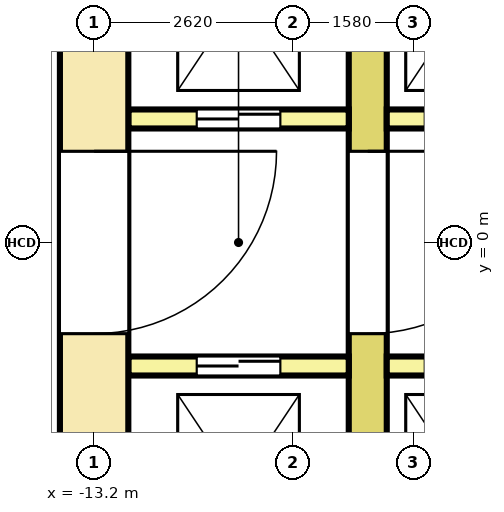
"""IFC4 building model, lengths in metres.
Left out: names, types, materials, properties, quantities, classifications, styles, units other than length and angle.
Written with IfcOpenShell. Run it as: python <this file> out.ifc"""

import sys

from ifc_helpers import new_model, si_unit, direction, frame, frame_2d, origin, place, context, subcontext, project, spatial, rectangle, extrude, element, fill, save


model = new_model("IFC4")
c1 = context("Model", 3, precision=1e-05, world=origin(), true_north=direction((0.0, 1.0)))
c2 = subcontext(c1, "Body", "Model", "MODEL_VIEW")
j1 = project(units=[si_unit("LENGTHUNIT", "METRE"), si_unit("PLANEANGLEUNIT", "RADIAN")], contexts=[c1])
p1 = place(None, origin())
s1 = spatial("IfcSite", under=j1, at=p1, CompositionType="ELEMENT")
p2 = place(p1, origin())
s2 = spatial("IfcBuilding", under=s1, at=p2, CompositionType="ELEMENT")
p3 = place(p2, frame((0.0, 0.0, 23.4)))
s3 = spatial("IfcBuildingStorey", under=s2, at=p3, CompositionType="ELEMENT", Elevation=23.4)
p4 = place(p3, frame((-13.2, -10.35, 0.0), z_axis=(0.0, 0.0, 1.0), x_axis=(0.0, 1.0, 0.0)))
e1 = element("IfcWall", 1, at=p4, inside=s3, PredefinedType="SHEAR", context=c2, shape_type="SweptSolid", body=[
    extrude(rectangle(XDim=20.7, YDim=0.9, at=frame_2d((10.35, 0.0))), origin(), (0.0, 0.0, 1.0), 4.1),
])
p5 = place(p4, frame((9.15, 0.0, 0.0)))
e2 = element("IfcOpeningElement", 2, at=p5, cuts=e1, PredefinedType="OPENING", context=c2, shape_type="SweptSolid", body=[
    extrude(rectangle(XDim=2.4, YDim=2.1, at=frame_2d((1.2, 1.05))), frame((0.0, 0.46, 0.0), z_axis=(0.0, -1.0, 0.0), x_axis=(1.0, 0.0, 0.0)), (0.0, 0.0, 1.0), 0.92),
])
p6 = place(p4, frame((16.05, 0.0, 0.0)))
e3 = element("IfcOpeningElement", 3, at=p6, cuts=e1, PredefinedType="OPENING", context=c2, shape_type="SweptSolid", body=[
    extrude(rectangle(XDim=1.2, YDim=2.1, at=frame_2d((0.6, 1.05))), frame((0.0, 0.46, 0.0), z_axis=(0.0, -1.0, 0.0), x_axis=(1.0, 0.0, 0.0)), (0.0, 0.0, 1.0), 0.92),
])
p7 = place(p4, frame((3.45, 0.0, 0.0)))
e4 = element("IfcOpeningElement", 4, at=p7, cuts=e1, PredefinedType="OPENING", context=c2, shape_type="SweptSolid", body=[
    extrude(rectangle(XDim=1.2, YDim=2.1, at=frame_2d((0.6, 1.05))), frame((0.0, 0.46, 0.0), z_axis=(0.0, -1.0, 0.0), x_axis=(1.0, 0.0, 0.0)), (0.0, 0.0, 1.0), 0.92),
])
p8 = place(p3, frame((-9.6, -7.7, 0.0), z_axis=(0.0, 0.0, 1.0), x_axis=(0.0, 1.0, 0.0)))
e5 = element("IfcWall", 5, at=p8, inside=s3, PredefinedType="SHEAR", context=c2, shape_type="SweptSolid", body=[
    extrude(rectangle(XDim=15.4, YDim=0.5, at=frame_2d((7.7, 0.0))), origin(), (0.0, 0.0, 1.0), 4.1),
])
p9 = place(p8, frame((6.5, 0.0, 0.0)))
e6 = element("IfcOpeningElement", 6, at=p9, cuts=e5, PredefinedType="OPENING", context=c2, shape_type="SweptSolid", body=[
    extrude(rectangle(XDim=2.4, YDim=2.1, at=frame_2d((1.2, 1.05))), frame((0.0, 0.26, 0.0), z_axis=(0.0, -1.0, 0.0), x_axis=(1.0, 0.0, 0.0)), (0.0, 0.0, 1.0), 0.52),
])
p10 = place(p8, frame((13.4, 0.0, 0.0)))
e7 = element("IfcOpeningElement", 7, at=p10, cuts=e5, PredefinedType="OPENING", context=c2, shape_type="SweptSolid", body=[
    extrude(rectangle(XDim=1.2, YDim=2.1, at=frame_2d((0.6, 1.05))), frame((0.0, 0.26, 0.0), z_axis=(0.0, -1.0, 0.0), x_axis=(1.0, 0.0, 0.0)), (0.0, 0.0, 1.0), 0.52),
])
p11 = place(p8, frame((0.8, 0.0, 0.0)))
e8 = element("IfcOpeningElement", 8, at=p11, cuts=e5, PredefinedType="OPENING", context=c2, shape_type="SweptSolid", body=[
    extrude(rectangle(XDim=1.2, YDim=2.1, at=frame_2d((0.6, 1.05))), frame((0.0, 0.26, 0.0), z_axis=(0.0, -1.0, 0.0), x_axis=(1.0, 0.0, 0.0)), (0.0, 0.0, 1.0), 0.52),
])
p12 = place(p3, frame((-12.75, 1.625, 0.0), z_axis=(0.0, 0.0, 1.0), x_axis=(1.0, 0.0, 0.0)))
e9 = element("IfcWall", 9, at=p12, inside=s3, PredefinedType="SOLIDWALL", context=c2, shape_type="SweptSolid", body=[
    extrude(rectangle(XDim=2.9, YDim=0.25, at=frame_2d((1.45, 0.0))), origin(), (0.0, 0.0, 1.0), 4.1),
])
p13 = place(p12, frame((0.9, 0.0, 0.0)))
e10 = element("IfcOpeningElement", 10, at=p13, cuts=e9, PredefinedType="OPENING", context=c2, shape_type="SweptSolid", body=[
    extrude(rectangle(XDim=1.1, YDim=2.1, at=frame_2d((0.55, 1.05))), frame((0.0, 0.135, 0.0), z_axis=(0.0, -1.0, 0.0), x_axis=(1.0, 0.0, 0.0)), (0.0, 0.0, 1.0), 0.27),
])
p14 = place(p3, frame((-9.35, 1.625, 0.0), z_axis=(0.0, 0.0, 1.0), x_axis=(1.0, 0.0, 0.0)))
e11 = element("IfcWall", 11, at=p14, inside=s3, PredefinedType="SOLIDWALL", context=c2, shape_type="SweptSolid", body=[
    extrude(rectangle(XDim=18.7, YDim=0.25, at=frame_2d((9.35, 0.0))), origin(), (0.0, 0.0, 1.0), 4.1),
])
p15 = place(p14, frame((0.5, 0.0, 0.0)))
e12 = element("IfcOpeningElement", 12, at=p15, cuts=e11, PredefinedType="OPENING", context=c2, shape_type="SweptSolid", body=[
    extrude(rectangle(XDim=1.1, YDim=2.1, at=frame_2d((0.55, 1.05))), frame((0.0, 0.135, 0.0), z_axis=(0.0, -1.0, 0.0), x_axis=(1.0, 0.0, 0.0)), (0.0, 0.0, 1.0), 0.27),
])
p16 = place(p14, frame((17.1, 0.0, 0.0)))
e13 = element("IfcOpeningElement", 13, at=p16, cuts=e11, PredefinedType="OPENING", context=c2, shape_type="SweptSolid", body=[
    extrude(rectangle(XDim=1.1, YDim=2.1, at=frame_2d((0.55, 1.05))), frame((0.0, 0.135, 0.0), z_axis=(0.0, -1.0, 0.0), x_axis=(1.0, 0.0, 0.0)), (0.0, 0.0, 1.0), 0.27),
])
p17 = place(p3, frame((-12.75, -1.625, 0.0), z_axis=(0.0, 0.0, 1.0), x_axis=(1.0, 0.0, 0.0)))
e14 = element("IfcWall", 14, at=p17, inside=s3, PredefinedType="SOLIDWALL", context=c2, shape_type="SweptSolid", body=[
    extrude(rectangle(XDim=2.9, YDim=0.25, at=frame_2d((1.45, 0.0))), origin(), (0.0, 0.0, 1.0), 4.1),
])
p18 = place(p17, frame((0.9, 0.0, 0.0)))
e15 = element("IfcOpeningElement", 15, at=p18, cuts=e14, PredefinedType="OPENING", context=c2, shape_type="SweptSolid", body=[
    extrude(rectangle(XDim=1.1, YDim=2.1, at=frame_2d((0.55, 1.05))), frame((0.0, 0.135, 0.0), z_axis=(0.0, -1.0, 0.0), x_axis=(1.0, 0.0, 0.0)), (0.0, 0.0, 1.0), 0.27),
])
p19 = place(p3, frame((-9.35, -1.625, 0.0), z_axis=(0.0, 0.0, 1.0), x_axis=(1.0, 0.0, 0.0)))
e16 = element("IfcWall", 16, at=p19, inside=s3, PredefinedType="SOLIDWALL", context=c2, shape_type="SweptSolid", body=[
    extrude(rectangle(XDim=18.7, YDim=0.25, at=frame_2d((9.35, 0.0))), origin(), (0.0, 0.0, 1.0), 4.1),
])
p20 = place(p19, frame((0.5, 0.0, 0.0)))
e17 = element("IfcOpeningElement", 17, at=p20, cuts=e16, PredefinedType="OPENING", context=c2, shape_type="SweptSolid", body=[
    extrude(rectangle(XDim=1.1, YDim=2.1, at=frame_2d((0.55, 1.05))), frame((0.0, 0.135, 0.0), z_axis=(0.0, -1.0, 0.0), x_axis=(1.0, 0.0, 0.0)), (0.0, 0.0, 1.0), 0.27),
])
p21 = place(p19, frame((17.1, 0.0, 0.0)))
e18 = element("IfcOpeningElement", 18, at=p21, cuts=e16, PredefinedType="OPENING", context=c2, shape_type="SweptSolid", body=[
    extrude(rectangle(XDim=1.1, YDim=2.1, at=frame_2d((0.55, 1.05))), frame((0.0, 0.135, 0.0), z_axis=(0.0, -1.0, 0.0), x_axis=(1.0, 0.0, 0.0)), (0.0, 0.0, 1.0), 0.27),
])
p22 = place(p13, origin())
e19 = element("IfcDoor", 19, at=p22, inside=s3, OperationType="DOUBLE_DOOR_SLIDING", PredefinedType="DOOR", context=c2, shape_type="SweptSolid", body=[
    extrude(rectangle(XDim=1.1, YDim=2.1, at=frame_2d((0.55, 1.05))), frame((0.0, 0.075, 0.0), z_axis=(0.0, -1.0, 0.0), x_axis=(1.0, 0.0, 0.0)), (0.0, 0.0, 1.0), 0.15),
])
fill(e10, e19)
p23 = place(p18, origin())
e20 = element("IfcDoor", 20, at=p23, inside=s3, OperationType="DOUBLE_DOOR_SLIDING", PredefinedType="DOOR", context=c2, shape_type="SweptSolid", body=[
    extrude(rectangle(XDim=1.1, YDim=2.1, at=frame_2d((0.55, 1.05))), frame((0.0, 0.075, 0.0), z_axis=(0.0, -1.0, 0.0), x_axis=(1.0, 0.0, 0.0)), (0.0, 0.0, 1.0), 0.15),
])
fill(e15, e20)
p24 = place(p9, origin())
e21 = element("IfcDoor", 21, at=p24, inside=s3, OperationType="DOUBLE_DOOR_SINGLE_SWING", PredefinedType="DOOR", context=c2, shape_type="SweptSolid", body=[
    extrude(rectangle(XDim=2.4, YDim=2.1, at=frame_2d((1.2, 1.05))), frame((0.0, 0.2, 0.0), z_axis=(0.0, -1.0, 0.0), x_axis=(1.0, 0.0, 0.0)), (0.0, 0.0, 1.0), 0.4),
])
fill(e6, e21)
p25 = place(p5, origin())
e22 = element("IfcDoor", 22, at=p25, inside=s3, OperationType="DOUBLE_DOOR_SINGLE_SWING", PredefinedType="DOOR", context=c2, shape_type="SweptSolid", body=[
    extrude(rectangle(XDim=2.4, YDim=2.1, at=frame_2d((1.2, 1.05))), frame((0.0, 0.3, 0.0), z_axis=(0.0, -1.0, 0.0), x_axis=(1.0, 0.0, 0.0)), (0.0, 0.0, 1.0), 0.6),
])
fill(e2, e22)
save(model, sys.argv[1])
